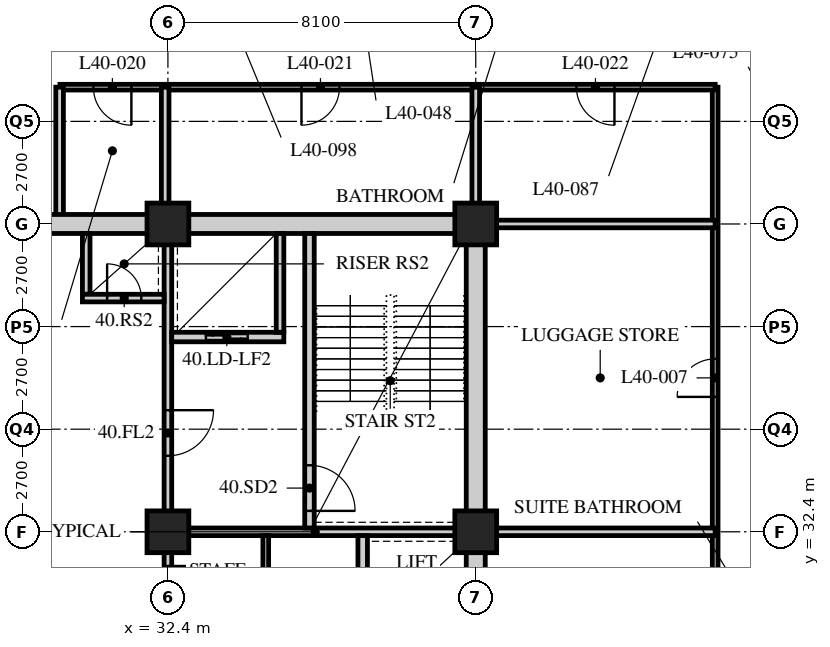
"""IFC4 building model, lengths in metres.
Left out: names, types, materials, properties, quantities, classifications, styles, units other than length and angle.
Written with IfcOpenShell. Run it as: python <this file> out.ifc"""

import sys

from ifc_helpers import new_model, si_unit, direction, frame, frame_2d, origin, origin_2d, place, context, subcontext, project, spatial, rectangle, hollow_rectangle, extrude, element, fill, save


model = new_model("IFC4")
c1 = context("Model", 3, precision=1e-05, world=origin(), true_north=direction((0.0, 1.0)))
c2 = subcontext(c1, "Body", "Model", "MODEL_VIEW")
j1 = project(units=[si_unit("LENGTHUNIT", "METRE"), si_unit("PLANEANGLEUNIT", "RADIAN")], contexts=[c1])
p1 = place(None, origin())
s1 = spatial("IfcSite", under=j1, at=p1, CompositionType="ELEMENT")
p2 = place(p1, origin())
s2 = spatial("IfcBuilding", under=s1, at=p2, CompositionType="ELEMENT")
p3 = place(p2, frame((0.0, 0.0, 154.4)))
s3 = spatial("IfcBuildingStorey", under=s2, at=p3, CompositionType="ELEMENT", Elevation=154.4)
for number, where, z_axis, x_axis in (
    (1, (32.4, 32.4, 0.0), (0.0, 0.0, 1.0), (1.0, 0.0, 0.0)),
    (2, (32.4, 40.5, 0.0), (0.0, 0.0, 1.0), (1.0, 0.0, 0.0)),
    (3, (40.5, 32.4, 0.0), (0.0, 0.0, 1.0), (1.0, 0.0, 0.0)),
    (4, (40.5, 40.5, 0.0), (0.0, 0.0, 1.0), (1.0, 0.0, 0.0)),
):
    element("IfcColumn", number, at=place(p3, frame(where, z_axis=z_axis, x_axis=x_axis)), inside=s3, PredefinedType="COLUMN", context=c2, shape_type="SweptSolid", body=[
        extrude(hollow_rectangle(XDim=1.1, YDim=1.1, WallThickness=0.1, at=origin_2d()), origin(), (0.0, 0.0, 1.0), 3.4),
    ])
p4 = place(p3, frame((46.8, 19.35, 0.0), z_axis=(0.0, 0.0, 1.0), x_axis=(0.0, 1.0, 0.0)))
e5 = element("IfcWall", 5, at=p4, inside=s3, PredefinedType="PARTITIONING", context=c2, shape_type="SweptSolid", body=[
    extrude(rectangle(XDim=24.75, YDim=0.15, at=frame_2d((12.375, 0.0))), origin(), (0.0, 0.0, 1.0), 3.15),
])
p5 = place(p4, frame((5.25, 0.0, 0.0)))
e6 = element("IfcOpeningElement", 6, at=p5, cuts=e5, PredefinedType="OPENING", context=c2, shape_type="SweptSolid", body=[
    extrude(rectangle(XDim=1.0, YDim=2.1, at=frame_2d((0.5, 1.05))), frame((0.0, 0.085, 0.0), z_axis=(0.0, -1.0, 0.0), x_axis=(1.0, 0.0, 0.0)), (0.0, 0.0, 1.0), 0.17),
])
p6 = place(p4, frame((9.3, 0.0, 0.0)))
e7 = element("IfcOpeningElement", 7, at=p6, cuts=e5, PredefinedType="OPENING", context=c2, shape_type="SweptSolid", body=[
    extrude(rectangle(XDim=1.0, YDim=2.1, at=frame_2d((0.5, 1.05))), frame((0.0, 0.085, 0.0), z_axis=(0.0, -1.0, 0.0), x_axis=(1.0, 0.0, 0.0)), (0.0, 0.0, 1.0), 0.17),
])
p7 = place(p4, frame((16.6, 0.0, 0.0)))
e8 = element("IfcOpeningElement", 8, at=p7, cuts=e5, PredefinedType="OPENING", context=c2, shape_type="SweptSolid", body=[
    extrude(rectangle(XDim=1.0, YDim=2.1, at=frame_2d((0.5, 1.05))), frame((0.0, 0.085, 0.0), z_axis=(0.0, -1.0, 0.0), x_axis=(1.0, 0.0, 0.0)), (0.0, 0.0, 1.0), 0.17),
])
p8 = place(p3, frame((46.8, 44.1, 0.0), z_axis=(0.0, 0.0, 1.0), x_axis=(-1.0, 0.0, 0.0)))
e9 = element("IfcWall", 9, at=p8, inside=s3, PredefinedType="PARTITIONING", context=c2, shape_type="SweptSolid", body=[
    extrude(rectangle(XDim=17.24, YDim=0.15, at=frame_2d((8.62, 0.0))), origin(), (0.0, 0.0, 1.0), 3.15),
])
p9 = place(p8, frame((15.361, 0.0, 0.0)))
e10 = element("IfcOpeningElement", 10, at=p9, cuts=e9, PredefinedType="OPENING", context=c2, shape_type="SweptSolid", body=[
    extrude(rectangle(XDim=1.0, YDim=2.1, at=frame_2d((0.5, 1.05))), frame((0.0, 0.085, 0.0), z_axis=(0.0, -1.0, 0.0), x_axis=(1.0, 0.0, 0.0)), (0.0, 0.0, 1.0), 0.17),
])
p10 = place(p8, frame((9.886, 0.0, 0.0)))
e11 = element("IfcOpeningElement", 11, at=p10, cuts=e9, PredefinedType="OPENING", context=c2, shape_type="SweptSolid", body=[
    extrude(rectangle(XDim=1.0, YDim=2.1, at=frame_2d((0.5, 1.05))), frame((0.0, 0.085, 0.0), z_axis=(0.0, -1.0, 0.0), x_axis=(1.0, 0.0, 0.0)), (0.0, 0.0, 1.0), 0.17),
])
p11 = place(p8, frame((2.65, 0.0, 0.0)))
e12 = element("IfcOpeningElement", 12, at=p11, cuts=e9, PredefinedType="OPENING", context=c2, shape_type="SweptSolid", body=[
    extrude(rectangle(XDim=1.0, YDim=2.1, at=frame_2d((0.5, 1.05))), frame((0.0, 0.085, 0.0), z_axis=(0.0, -1.0, 0.0), x_axis=(1.0, 0.0, 0.0)), (0.0, 0.0, 1.0), 0.17),
])
p12 = place(p3, frame((40.5, 32.4, 0.0), z_axis=(0.0, 0.0, 1.0), x_axis=(1.0, 0.0, 0.0)))
e13 = element("IfcWall", 13, at=p12, inside=s3, PredefinedType="SOLIDWALL", context=c2, shape_type="SweptSolid", body=[
    extrude(rectangle(XDim=6.3, YDim=0.2, at=frame_2d((3.15, 0.0))), origin(), (0.0, 0.0, 1.0), 3.15),
])
for number, where, z_axis, x_axis in (
    (14, (40.5, 40.5, 0.0), (0.0, 0.0, 1.0), (0.0, 1.0, 0.0)),
    (15, (32.328, 44.1, 0.0), (0.0, 0.0, 1.0), (0.0, -1.0, 0.0)),
):
    element("IfcWall", number, at=place(p3, frame(where, z_axis=z_axis, x_axis=x_axis)), inside=s3, PredefinedType="SOLIDWALL", context=c2, shape_type="SweptSolid", body=[
        extrude(rectangle(XDim=3.6, YDim=0.2, at=frame_2d((1.8, 0.0))), origin(), (0.0, 0.0, 1.0), 2.15),
    ])
p13 = place(p3, frame((29.55, 40.5, 0.0), z_axis=(0.0, 0.0, 1.0), x_axis=(0.0, 1.0, 0.0)))
e16 = element("IfcWall", 16, at=p13, inside=s3, PredefinedType="SOLIDWALL", context=c2, shape_type="SweptSolid", body=[
    extrude(rectangle(XDim=3.6, YDim=0.2, at=frame_2d((1.8, 0.0))), origin(), (0.0, 0.0, 1.0), 3.15),
])
p14 = place(p3, frame((40.5, 40.5, 0.0), z_axis=(0.0, 0.0, 1.0), x_axis=(1.0, 0.0, 0.0)))
e17 = element("IfcWall", 17, at=p14, inside=s3, PredefinedType="SOLIDWALL", context=c2, shape_type="SweptSolid", body=[
    extrude(rectangle(XDim=6.3, YDim=0.2, at=frame_2d((3.15, 0.0))), origin(), (0.0, 0.0, 1.0), 3.15),
])
p15 = place(p3, frame((24.3, 40.5, 0.0), z_axis=(0.0, 0.0, 1.0), x_axis=(1.0, 0.0, 0.0)))
e18 = element("IfcWall", 18, at=p15, inside=s3, PredefinedType="SOLIDWALL", context=c2, shape_type="SweptSolid", body=[
    extrude(rectangle(XDim=8.1, YDim=0.5, at=frame_2d((4.05, 0.0))), origin(), (0.0, 0.0, 1.0), 2.5),
])
p16 = place(p15, frame((3.15, 0.0, 0.0)))
e19 = element("IfcOpeningElement", 19, at=p16, cuts=e18, PredefinedType="OPENING", context=c2, shape_type="SweptSolid", body=[
    extrude(rectangle(XDim=1.8, YDim=2.4, at=frame_2d((0.9, 1.2))), frame((0.0, 0.26, 0.0), z_axis=(0.0, -1.0, 0.0), x_axis=(1.0, 0.0, 0.0)), (0.0, 0.0, 1.0), 0.52),
])
p17 = place(p3, frame((32.4, 40.5, 0.0), z_axis=(0.0, 0.0, 1.0), x_axis=(1.0, 0.0, 0.0)))
e20 = element("IfcWall", 20, at=p17, inside=s3, PredefinedType="SOLIDWALL", context=c2, shape_type="SweptSolid", body=[
    extrude(rectangle(XDim=8.35, YDim=0.5, at=frame_2d((4.175, 0.0))), origin(), (0.0, 0.0, 1.0), 2.38),
])
p18 = place(p3, frame((40.5, 24.55, 0.0), z_axis=(0.0, 0.0, 1.0), x_axis=(0.0, 1.0, 0.0)))
e21 = element("IfcWall", 21, at=p18, inside=s3, PredefinedType="SOLIDWALL", context=c2, shape_type="SweptSolid", body=[
    extrude(rectangle(XDim=15.7, YDim=0.5, at=frame_2d((7.85, 0.0))), origin(), (0.0, 0.0, 1.0), 2.15),
])
p19 = place(p3, frame((32.3, 32.4, 0.0), z_axis=(0.0, 0.0, 1.0), x_axis=(1.0, 0.0, 0.0)))
e22 = element("IfcWall", 22, at=p19, inside=s3, PredefinedType="SOLIDWALL", context=c2, shape_type="SweptSolid", body=[
    extrude(rectangle(XDim=7.95, YDim=0.2, at=frame_2d((3.975, 0.0))), origin(), (0.0, 0.0, 1.0), 2.388),
])
p20 = place(p3, frame((32.4, 32.5, 0.0), z_axis=(0.0, 0.0, 1.0), x_axis=(0.0, 1.0, 0.0)))
e23 = element("IfcWall", 23, at=p20, inside=s3, PredefinedType="SOLIDWALL", context=c2, shape_type="SweptSolid", body=[
    extrude(rectangle(XDim=7.75, YDim=0.2, at=frame_2d((3.875, 0.0))), origin(), (0.0, 0.0, 1.0), 2.388),
])
p21 = place(p20, frame((1.9, 0.0, 0.0)))
e24 = element("IfcOpeningElement", 24, at=p21, cuts=e23, PredefinedType="OPENING", context=c2, shape_type="SweptSolid", body=[
    extrude(rectangle(XDim=1.2, YDim=2.1, at=frame_2d((0.6, 1.05))), frame((0.0, 0.11, 0.0), z_axis=(0.0, -1.0, 0.0), x_axis=(1.0, 0.0, 0.0)), (0.0, 0.0, 1.0), 0.22),
])
p22 = place(p3, frame((37.525, 24.55, 0.0), z_axis=(0.0, 0.0, 1.0), x_axis=(0.0, 1.0, 0.0)))
e25 = element("IfcWall", 25, at=p22, inside=s3, PredefinedType="SOLIDWALL", context=c2, shape_type="SweptSolid", body=[
    extrude(rectangle(XDim=7.75, YDim=0.25, at=frame_2d((3.875, 0.0))), origin(), (0.0, 0.0, 1.0), 3.15),
])
p23 = place(p3, frame((36.125, 32.5, 0.0), z_axis=(0.0, 0.0, 1.0), x_axis=(0.0, 1.0, 0.0)))
e26 = element("IfcWall", 26, at=p23, inside=s3, PredefinedType="SOLIDWALL", context=c2, shape_type="SweptSolid", body=[
    extrude(rectangle(XDim=7.75, YDim=0.25, at=frame_2d((3.875, 0.0))), origin(), (0.0, 0.0, 1.0), 3.15),
])
p24 = place(p23, frame((0.45, 0.0, 0.0)))
e27 = element("IfcOpeningElement", 27, at=p24, cuts=e26, PredefinedType="OPENING", context=c2, shape_type="SweptSolid", body=[
    extrude(rectangle(XDim=1.2, YDim=2.1, at=frame_2d((0.6, 1.05))), frame((0.0, 0.135, 0.0), z_axis=(0.0, -1.0, 0.0), x_axis=(1.0, 0.0, 0.0)), (0.0, 0.0, 1.0), 0.27),
])
p25 = place(p3, frame((32.5, 37.525, 0.0), z_axis=(0.0, 0.0, 1.0), x_axis=(1.0, 0.0, 0.0)))
e28 = element("IfcWall", 28, at=p25, inside=s3, PredefinedType="SOLIDWALL", context=c2, shape_type="SweptSolid", body=[
    extrude(rectangle(XDim=2.95, YDim=0.25, at=frame_2d((1.475, 0.0))), origin(), (0.0, 0.0, 1.0), 3.15),
])
p26 = place(p25, frame((0.9, 0.0, 0.0)))
e29 = element("IfcOpeningElement", 29, at=p26, cuts=e28, PredefinedType="OPENING", context=c2, shape_type="SweptSolid", body=[
    extrude(rectangle(XDim=1.1, YDim=2.4, at=frame_2d((0.55, 1.2))), frame((0.0, 0.135, 0.0), z_axis=(0.0, -1.0, 0.0), x_axis=(1.0, 0.0, 0.0)), (0.0, 0.0, 1.0), 0.27),
])
p27 = place(p3, frame((35.35, 37.65, 0.0), z_axis=(0.0, 0.0, 1.0), x_axis=(0.0, 1.0, 0.0)))
e30 = element("IfcWall", 30, at=p27, inside=s3, PredefinedType="SOLIDWALL", context=c2, shape_type="SweptSolid", body=[
    extrude(rectangle(XDim=2.6, YDim=0.2, at=frame_2d((1.3, 0.0))), origin(), (0.0, 0.0, 1.0), 3.15),
])
p28 = place(p3, frame((30.25, 38.65, 0.0), z_axis=(0.0, 0.0, 1.0), x_axis=(0.0, 1.0, 0.0)))
e31 = element("IfcWall", 31, at=p28, inside=s3, PredefinedType="SOLIDWALL", context=c2, shape_type="SweptSolid", body=[
    extrude(rectangle(XDim=1.6, YDim=0.2, at=frame_2d((0.8, 0.0))), origin(), (0.0, 0.0, 1.0), 3.15),
])
p29 = place(p3, frame((30.15, 38.55, 0.0), z_axis=(0.0, 0.0, 1.0), x_axis=(1.0, 0.0, 0.0)))
e32 = element("IfcWall", 32, at=p29, inside=s3, PredefinedType="SOLIDWALL", context=c2, shape_type="SweptSolid", body=[
    extrude(rectangle(XDim=2.15, YDim=0.2, at=frame_2d((1.075, 0.0))), origin(), (0.0, 0.0, 1.0), 3.15),
])
p30 = place(p29, frame((0.65, 0.0, 0.0)))
e33 = element("IfcOpeningElement", 33, at=p30, cuts=e32, PredefinedType="OPENING", context=c2, shape_type="SweptSolid", body=[
    extrude(rectangle(XDim=0.9, YDim=2.1, at=frame_2d((0.45, 1.05))), frame((0.0, 0.11, 0.0), z_axis=(0.0, -1.0, 0.0), x_axis=(1.0, 0.0, 0.0)), (0.0, 0.0, 1.0), 0.22),
])
p31 = place(p3, frame((32.4, 24.55, 0.0), z_axis=(0.0, 0.0, 1.0), x_axis=(0.0, 1.0, 0.0)))
e34 = element("IfcWall", 34, at=p31, inside=s3, PredefinedType="PARTITIONING", context=c2, shape_type="SweptSolid", body=[
    extrude(rectangle(XDim=7.75, YDim=0.2, at=frame_2d((3.875, 0.0))), origin(), (0.0, 0.0, 1.0), 2.388),
])
p32 = place(p31, frame((0.65, 0.0, 0.0)))
e35 = element("IfcOpeningElement", 35, at=p32, cuts=e34, PredefinedType="OPENING", context=c2, shape_type="SweptSolid", body=[
    extrude(rectangle(XDim=0.9, YDim=2.1, at=frame_2d((0.45, 1.05))), frame((0.0, 0.11, 0.0), z_axis=(0.0, -1.0, 0.0), x_axis=(1.0, 0.0, 0.0)), (0.0, 0.0, 1.0), 0.22),
])
p33 = place(p31, frame((2.15, 0.0, 0.0)))
e36 = element("IfcOpeningElement", 36, at=p33, cuts=e34, PredefinedType="OPENING", context=c2, shape_type="SweptSolid", body=[
    extrude(rectangle(XDim=0.9, YDim=2.1, at=frame_2d((0.45, 1.05))), frame((0.0, 0.11, 0.0), z_axis=(0.0, -1.0, 0.0), x_axis=(1.0, 0.0, 0.0)), (0.0, 0.0, 1.0), 0.22),
])
p34 = place(p31, frame((3.8, 0.0, 0.0)))
e37 = element("IfcOpeningElement", 37, at=p34, cuts=e34, PredefinedType="OPENING", context=c2, shape_type="SweptSolid", body=[
    extrude(rectangle(XDim=1.0, YDim=2.1, at=frame_2d((0.5, 1.05))), frame((0.0, 0.11, 0.0), z_axis=(0.0, -1.0, 0.0), x_axis=(1.0, 0.0, 0.0)), (0.0, 0.0, 1.0), 0.22),
])
p35 = place(p31, frame((6.05, 0.0, 0.0)))
e38 = element("IfcOpeningElement", 38, at=p35, cuts=e34, PredefinedType="OPENING", context=c2, shape_type="SweptSolid", body=[
    extrude(rectangle(XDim=0.9, YDim=2.1, at=frame_2d((0.45, 1.05))), frame((0.0, 0.11, 0.0), z_axis=(0.0, -1.0, 0.0), x_axis=(1.0, 0.0, 0.0)), (0.0, 0.0, 1.0), 0.22),
])
p36 = place(p3, frame((34.975, 28.05, 0.0), z_axis=(0.0, 0.0, 1.0), x_axis=(0.0, 1.0, 0.0)))
e39 = element("IfcWall", 39, at=p36, inside=s3, PredefinedType="PARTITIONING", context=c2, shape_type="SweptSolid", body=[
    extrude(rectangle(XDim=4.25, YDim=0.15, at=frame_2d((2.125, 0.0))), origin(), (0.0, 0.0, 1.0), 3.15),
])
p37 = place(p7, origin())
e40 = element("IfcDoor", 40, at=p37, inside=s3, OperationType="SINGLE_SWING_LEFT", PredefinedType="DOOR", context=c2, shape_type="SweptSolid", body=[
    extrude(rectangle(XDim=1.0, YDim=2.1, at=frame_2d((0.5, 1.05))), frame((0.0, 0.025, 0.0), z_axis=(0.0, -1.0, 0.0), x_axis=(1.0, 0.0, 0.0)), (0.0, 0.0, 1.0), 0.05),
])
fill(e8, e40)
p38 = place(p9, origin())
e41 = element("IfcDoor", 41, at=p38, inside=s3, OperationType="SINGLE_SWING_LEFT", PredefinedType="DOOR", context=c2, shape_type="SweptSolid", body=[
    extrude(rectangle(XDim=1.0, YDim=2.1, at=frame_2d((0.5, 1.05))), frame((0.0, 0.025, 0.0), z_axis=(0.0, -1.0, 0.0), x_axis=(1.0, 0.0, 0.0)), (0.0, 0.0, 1.0), 0.05),
])
fill(e10, e41)
p39 = place(p10, origin())
e42 = element("IfcDoor", 42, at=p39, inside=s3, OperationType="SINGLE_SWING_RIGHT", PredefinedType="DOOR", context=c2, shape_type="SweptSolid", body=[
    extrude(rectangle(XDim=1.0, YDim=2.1, at=frame_2d((0.5, 1.05))), frame((0.0, 0.025, 0.0), z_axis=(0.0, -1.0, 0.0), x_axis=(1.0, 0.0, 0.0)), (0.0, 0.0, 1.0), 0.05),
])
fill(e11, e42)
p40 = place(p11, origin())
e43 = element("IfcDoor", 43, at=p40, inside=s3, OperationType="SINGLE_SWING_LEFT", PredefinedType="DOOR", context=c2, shape_type="SweptSolid", body=[
    extrude(rectangle(XDim=1.0, YDim=2.1, at=frame_2d((0.5, 1.05))), frame((0.0, 0.025, 0.0), z_axis=(0.0, -1.0, 0.0), x_axis=(1.0, 0.0, 0.0)), (0.0, 0.0, 1.0), 0.05),
])
fill(e12, e43)
p41 = place(p35, origin())
e44 = element("IfcDoor", 44, at=p41, inside=s3, OperationType="SINGLE_SWING_LEFT", PredefinedType="DOOR", context=c2, shape_type="SweptSolid", body=[
    extrude(rectangle(XDim=0.9, YDim=2.1, at=frame_2d((0.45, 1.05))), frame((0.0, 0.025, 0.0), z_axis=(0.0, -1.0, 0.0), x_axis=(1.0, 0.0, 0.0)), (0.0, 0.0, 1.0), 0.05),
])
fill(e38, e44)
p42 = place(p24, origin())
e45 = element("IfcDoor", 45, at=p42, inside=s3, OperationType="SINGLE_SWING_RIGHT", PredefinedType="DOOR", context=c2, shape_type="SweptSolid", body=[
    extrude(rectangle(XDim=1.2, YDim=2.1, at=frame_2d((0.6, 1.05))), frame((0.0, 0.025, 0.0), z_axis=(0.0, -1.0, 0.0), x_axis=(1.0, 0.0, 0.0)), (0.0, 0.0, 1.0), 0.05),
])
fill(e27, e45)
p43 = place(p21, origin())
e46 = element("IfcDoor", 46, at=p43, inside=s3, OperationType="SINGLE_SWING_LEFT", PredefinedType="DOOR", context=c2, shape_type="SweptSolid", body=[
    extrude(rectangle(XDim=1.2, YDim=2.1, at=frame_2d((0.6, 1.05))), frame((0.0, 0.025, 0.0), z_axis=(0.0, -1.0, 0.0), x_axis=(1.0, 0.0, 0.0)), (0.0, 0.0, 1.0), 0.05),
])
fill(e24, e46)
p44 = place(p30, origin())
e47 = element("IfcDoor", 47, at=p44, inside=s3, OperationType="SINGLE_SWING_LEFT", PredefinedType="DOOR", context=c2, shape_type="SweptSolid", body=[
    extrude(rectangle(XDim=0.9, YDim=2.1, at=frame_2d((0.45, 1.05))), frame((0.0, 0.025, 0.0), z_axis=(0.0, -1.0, 0.0), x_axis=(1.0, 0.0, 0.0)), (0.0, 0.0, 1.0), 0.05),
])
fill(e33, e47)
p45 = place(p26, origin())
e48 = element("IfcDoor", 48, at=p45, inside=s3, OperationType="DOUBLE_DOOR_SLIDING", PredefinedType="DOOR", context=c2, shape_type="SweptSolid", body=[
    extrude(rectangle(XDim=1.1, YDim=2.4, at=frame_2d((0.55, 1.2))), frame((0.0, 0.025, 0.0), z_axis=(0.0, -1.0, 0.0), x_axis=(1.0, 0.0, 0.0)), (0.0, 0.0, 1.0), 0.05),
])
fill(e29, e48)
save(model, sys.argv[1])
